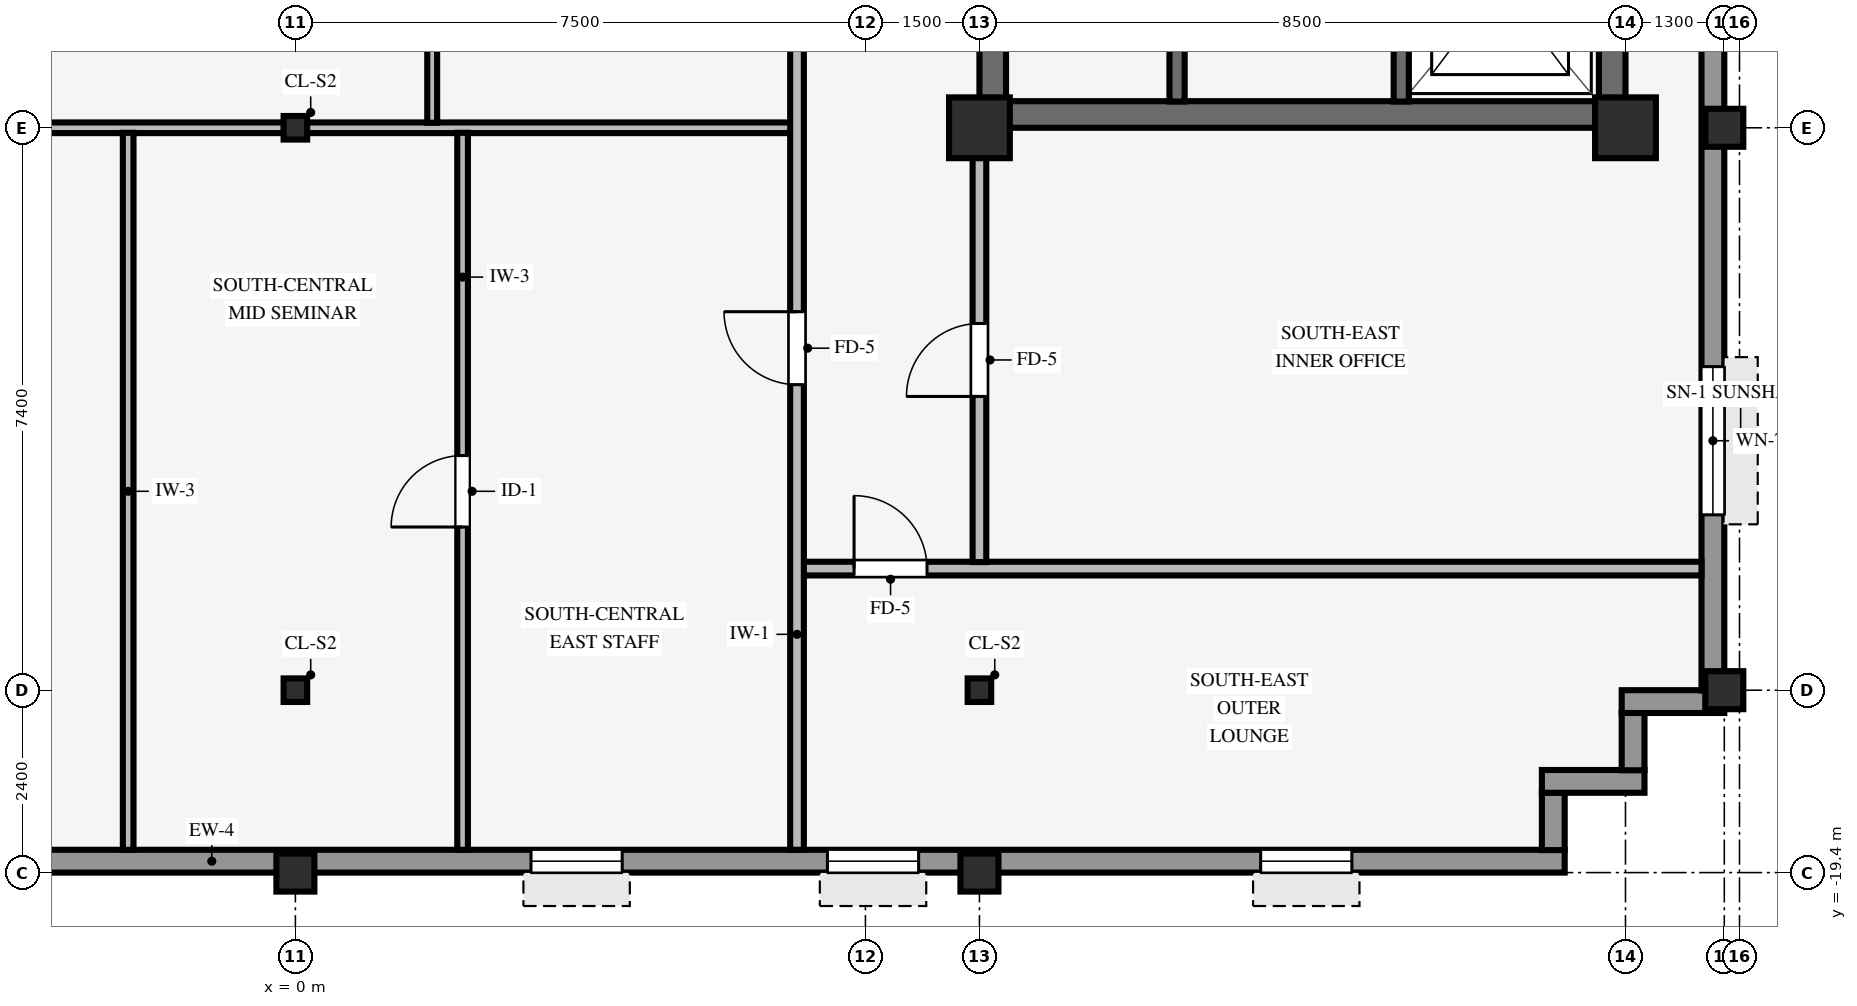
"""IFC4 building model, lengths in metres.
Left out: names, types, materials, properties, quantities, classifications, styles, units other than length and angle.
Written with IfcOpenShell. Run it as: python <this file> out.ifc"""

import sys

from ifc_helpers import new_model, si_unit, direction, frame, frame_2d, origin, origin_2d, place, context, subcontext, project, spatial, rectangle, hollow_rectangle, i_section, extrude, source, transform, mapped, element, fill, save


model = new_model("IFC4")
c1 = context("Model", 3, precision=1e-05, world=origin(), true_north=direction((0.0, 1.0)))
c2 = subcontext(c1, "Body", "Model", "MODEL_VIEW")
j1 = project(units=[si_unit("LENGTHUNIT", "METRE"), si_unit("PLANEANGLEUNIT", "RADIAN")], contexts=[c1])
p1 = place(None, origin())
s1 = spatial("IfcSite", under=j1, at=p1, CompositionType="ELEMENT")
p2 = place(p1, origin())
s2 = spatial("IfcBuilding", under=s1, at=p2, CompositionType="ELEMENT")
p3 = place(p2, frame((0.0, 0.0, 268.9)))
s3 = spatial("IfcBuildingStorey", under=s2, at=p3, CompositionType="ELEMENT", Elevation=268.9)
p4 = place(p3, frame((9.0, -9.425, 0.0), z_axis=(0.0, 0.0, 1.0), x_axis=(1.0, 0.0, 0.0)))
e1 = element("IfcWall", 1, at=p4, inside=s3, PredefinedType="SHEAR", context=c2, shape_type="SweptSolid", body=[
    extrude(rectangle(XDim=8.5, YDim=0.35, at=frame_2d((4.25, 0.0))), origin(), (0.0, 0.0, 1.0), 3.37),
])
p5 = place(p3, frame((9.175, -9.255, 0.0), z_axis=(0.0, 0.0, 1.0), x_axis=(0.0, 1.0, 0.0)))
e2 = element("IfcWall", 2, at=p5, inside=s3, PredefinedType="SHEAR", context=c2, shape_type="SweptSolid", body=[
    extrude(rectangle(XDim=18.51, YDim=0.35, at=frame_2d((9.255, 0.0))), origin(), (0.0, 0.0, 1.0), 3.37),
])
p6 = place(p5, frame((8.655, 0.0, 0.0)))
e3 = element("IfcOpeningElement", 3, at=p6, cuts=e2, PredefinedType="OPENING", context=c2, shape_type="SweptSolid", body=[
    extrude(rectangle(XDim=1.2, YDim=2.15, at=frame_2d((0.6, 1.075))), frame((0.0, 0.185, 0.0), z_axis=(0.0, -1.0, 0.0), x_axis=(1.0, 0.0, 0.0)), (0.0, 0.0, 1.0), 0.37),
])
p7 = place(p3, frame((17.325, -9.255, 0.0), z_axis=(0.0, 0.0, 1.0), x_axis=(0.0, 1.0, 0.0)))
e4 = element("IfcWall", 4, at=p7, inside=s3, PredefinedType="SHEAR", context=c2, shape_type="SweptSolid", body=[
    extrude(rectangle(XDim=18.51, YDim=0.35, at=frame_2d((9.255, 0.0))), origin(), (0.0, 0.0, 1.0), 3.37),
])
for number, where, z_axis, x_axis in (
    (5, (9.0, -9.6, 0.0), (0.0, 0.0, 1.0), (1.0, 0.0, 0.0)),
    (6, (17.5, -9.6, 0.0), (0.0, 0.0, 1.0), (1.0, 0.0, 0.0)),
):
    element("IfcColumn", number, at=place(p3, frame(where, z_axis=z_axis, x_axis=x_axis)), inside=s3, PredefinedType="COLUMN", context=c2, shape_type="SweptSolid", body=[
        extrude(rectangle(XDim=0.8, YDim=0.8, at=origin_2d()), origin(), (0.0, 0.0, 1.0), 3.37),
    ])
for number, where, z_axis, x_axis in (
    (7, (18.8, -17.0, 0.0), (0.0, 0.0, 1.0), (1.0, 0.0, 0.0)),
    (8, (18.8, -9.6, 0.0), (0.0, 0.0, 1.0), (1.0, 0.0, 0.0)),
    (9, (0.0, -19.4, 0.0), (0.0, 0.0, 1.0), (1.0, 0.0, 0.0)),
    (10, (9.0, -19.4, 0.0), (0.0, 0.0, 1.0), (1.0, 0.0, 0.0)),
):
    element("IfcColumn", number, at=place(p3, frame(where, z_axis=z_axis, x_axis=x_axis)), inside=s3, PredefinedType="COLUMN", context=c2, shape_type="SweptSolid", body=[
        extrude(hollow_rectangle(XDim=0.5, YDim=0.5, WallThickness=0.032, InnerFilletRadius=0.032, OuterFilletRadius=0.064, at=origin_2d()), origin(), (0.0, 0.0, 1.0), 3.37),
    ])
for number, where, z_axis, x_axis in (
    (11, (0.0, -17.0, 0.0), (0.0, 0.0, 1.0), (1.0, 0.0, 0.0)),
    (12, (0.0, -9.6, 0.0), (0.0, 0.0, 1.0), (1.0, 0.0, 0.0)),
    (13, (9.0, -17.0, 0.0), (0.0, 0.0, 1.0), (1.0, 0.0, 0.0)),
):
    element("IfcColumn", number, at=place(p3, frame(where, z_axis=z_axis, x_axis=x_axis)), inside=s3, PredefinedType="COLUMN", context=c2, shape_type="SweptSolid", body=[
        extrude(i_section(OverallWidth=0.31, OverallDepth=0.31, WebThickness=0.015, FlangeThickness=0.015, FilletRadius=0.015, at=origin_2d()), origin(), (0.0, 0.0, 1.0), 3.37),
    ])
p8 = place(p3, frame((-18.9, -19.25, 0.0), z_axis=(0.0, 0.0, 1.0), x_axis=(1.0, 0.0, 0.0)))
e14 = element("IfcWall", 14, at=p8, inside=s3, PredefinedType="STANDARD", context=c2, shape_type="SweptSolid", body=[
    extrude(rectangle(XDim=35.6, YDim=0.3, at=frame_2d((17.8, 0.0))), origin(), (0.0, 0.0, 1.0), 2.705),
])
p9 = place(p8, frame((1.9, 0.0, 0.8)))
e15 = element("IfcOpeningElement", 15, at=p9, cuts=e14, PredefinedType="OPENING", context=c2, shape_type="SweptSolid", body=[
    extrude(rectangle(XDim=1.2, YDim=1.48, at=frame_2d((0.6, 0.74))), frame((0.0, 0.16, 0.0), z_axis=(0.0, -1.0, 0.0), x_axis=(1.0, 0.0, 0.0)), (0.0, 0.0, 1.0), 0.32),
])
p10 = place(p8, frame((7.6, 0.0, 0.8)))
e16 = element("IfcOpeningElement", 16, at=p10, cuts=e14, PredefinedType="OPENING", context=c2, shape_type="SweptSolid", body=[
    extrude(rectangle(XDim=1.2, YDim=1.48, at=frame_2d((0.6, 0.74))), frame((0.0, 0.16, 0.0), z_axis=(0.0, -1.0, 0.0), x_axis=(1.0, 0.0, 0.0)), (0.0, 0.0, 1.0), 0.32),
])
p11 = place(p8, frame((12.85, 0.0, 0.8)))
e17 = element("IfcOpeningElement", 17, at=p11, cuts=e14, PredefinedType="OPENING", context=c2, shape_type="SweptSolid", body=[
    extrude(rectangle(XDim=1.2, YDim=1.48, at=frame_2d((0.6, 0.74))), frame((0.0, 0.16, 0.0), z_axis=(0.0, -1.0, 0.0), x_axis=(1.0, 0.0, 0.0)), (0.0, 0.0, 1.0), 0.32),
])
p12 = place(p8, frame((22.0, 0.0, 0.8)))
e18 = element("IfcOpeningElement", 18, at=p12, cuts=e14, PredefinedType="OPENING", context=c2, shape_type="SweptSolid", body=[
    extrude(rectangle(XDim=1.2, YDim=1.48, at=frame_2d((0.6, 0.74))), frame((0.0, 0.16, 0.0), z_axis=(0.0, -1.0, 0.0), x_axis=(1.0, 0.0, 0.0)), (0.0, 0.0, 1.0), 0.32),
])
p13 = place(p8, frame((25.9, 0.0, 0.8)))
e19 = element("IfcOpeningElement", 19, at=p13, cuts=e14, PredefinedType="OPENING", context=c2, shape_type="SweptSolid", body=[
    extrude(rectangle(XDim=1.2, YDim=1.48, at=frame_2d((0.6, 0.74))), frame((0.0, 0.16, 0.0), z_axis=(0.0, -1.0, 0.0), x_axis=(1.0, 0.0, 0.0)), (0.0, 0.0, 1.0), 0.32),
])
p14 = place(p8, frame((31.6, 0.0, 0.8)))
e20 = element("IfcOpeningElement", 20, at=p14, cuts=e14, PredefinedType="OPENING", context=c2, shape_type="SweptSolid", body=[
    extrude(rectangle(XDim=1.2, YDim=1.48, at=frame_2d((0.6, 0.74))), frame((0.0, 0.16, 0.0), z_axis=(0.0, -1.0, 0.0), x_axis=(1.0, 0.0, 0.0)), (0.0, 0.0, 1.0), 0.32),
])
p15 = place(p3, frame((16.55, -19.104, 0.0), z_axis=(0.0, 0.0, 1.0), x_axis=(0.0, 1.0, 0.0)))
e21 = element("IfcWall", 21, at=p15, inside=s3, PredefinedType="STANDARD", context=c2, shape_type="SweptSolid", body=[
    extrude(rectangle(XDim=0.758, YDim=0.3, at=frame_2d((0.379, 0.0))), origin(), (0.0, 0.0, 1.0), 2.892),
])
p16 = place(p3, frame((16.4, -18.2, 0.0), z_axis=(0.0, 0.0, 1.0), x_axis=(1.0, 0.0, 0.0)))
e22 = element("IfcWall", 22, at=p16, inside=s3, PredefinedType="STANDARD", context=c2, shape_type="SweptSolid", body=[
    extrude(rectangle(XDim=1.35, YDim=0.3, at=frame_2d((0.675, 0.0))), origin(), (0.0, 0.0, 1.0), 2.892),
])
p17 = place(p3, frame((17.6, -18.054, 0.0), z_axis=(0.0, 0.0, 1.0), x_axis=(0.0, 1.0, 0.0)))
e23 = element("IfcWall", 23, at=p17, inside=s3, PredefinedType="STANDARD", context=c2, shape_type="SweptSolid", body=[
    extrude(rectangle(XDim=0.758, YDim=0.3, at=frame_2d((0.379, 0.0))), origin(), (0.0, 0.0, 1.0), 2.892),
])
p18 = place(p3, frame((17.45, -17.15, 0.0), z_axis=(0.0, 0.0, 1.0), x_axis=(1.0, 0.0, 0.0)))
e24 = element("IfcWall", 24, at=p18, inside=s3, PredefinedType="STANDARD", context=c2, shape_type="SweptSolid", body=[
    extrude(rectangle(XDim=1.35, YDim=0.3, at=frame_2d((0.675, 0.0))), origin(), (0.0, 0.0, 1.0), 2.892),
])
p19 = place(p3, frame((18.65, -17.004, 0.0), z_axis=(0.0, 0.0, 1.0), x_axis=(0.0, 1.0, 0.0)))
e25 = element("IfcWall", 25, at=p19, inside=s3, PredefinedType="STANDARD", context=c2, shape_type="SweptSolid", body=[
    extrude(rectangle(XDim=34.008, YDim=0.3, at=frame_2d((17.004, 0.0))), origin(), (0.0, 0.0, 1.0), 2.705),
])
p20 = place(p19, frame((2.311, 0.0, 0.8)))
e26 = element("IfcOpeningElement", 26, at=p20, cuts=e25, PredefinedType="OPENING", context=c2, shape_type="SweptSolid", body=[
    extrude(rectangle(XDim=1.95, YDim=1.48, at=frame_2d((0.975, 0.74))), frame((0.0, 0.16, 0.0), z_axis=(0.0, -1.0, 0.0), x_axis=(1.0, 0.0, 0.0)), (0.0, 0.0, 1.0), 0.32),
])
p21 = place(p19, frame((29.747, 0.0, 0.8)))
e27 = element("IfcOpeningElement", 27, at=p21, cuts=e25, PredefinedType="OPENING", context=c2, shape_type="SweptSolid", body=[
    extrude(rectangle(XDim=1.95, YDim=1.48, at=frame_2d((0.975, 0.74))), frame((0.0, 0.16, 0.0), z_axis=(0.0, -1.0, 0.0), x_axis=(1.0, 0.0, 0.0)), (0.0, 0.0, 1.0), 0.32),
])
p22 = place(p3, frame((14.55, -9.255, 0.0), z_axis=(0.0, 0.0, 1.0), x_axis=(0.0, 1.0, 0.0)))
e28 = element("IfcWall", 28, at=p22, inside=s3, PredefinedType="SHEAR", context=c2, shape_type="SweptSolid", body=[
    extrude(rectangle(XDim=10.16, YDim=0.2, at=frame_2d((5.08, 0.0))), origin(), (0.0, 0.0, 1.0), 3.37),
])
p23 = place(p22, frame((6.615, 0.0, 0.0)))
e29 = element("IfcOpeningElement", 29, at=p23, cuts=e28, PredefinedType="OPENING", context=c2, shape_type="SweptSolid", body=[
    extrude(rectangle(XDim=0.88, YDim=2.1, at=frame_2d((0.44, 1.05))), frame((0.0, 0.11, 0.0), z_axis=(0.0, -1.0, 0.0), x_axis=(1.0, 0.0, 0.0)), (0.0, 0.0, 1.0), 0.22),
])
p24 = place(p22, frame((0.98, 0.0, 0.0)))
e30 = element("IfcOpeningElement", 30, at=p24, cuts=e28, PredefinedType="OPENING", context=c2, shape_type="SweptSolid", body=[
    extrude(rectangle(XDim=1.15, YDim=2.15, at=frame_2d((0.575, 1.075))), frame((0.0, 0.11, 0.0), z_axis=(0.0, -1.0, 0.0), x_axis=(1.0, 0.0, 0.0)), (0.0, 0.0, 1.0), 0.22),
])
p25 = place(p3, frame((11.6, -9.255, 0.0), z_axis=(0.0, 0.0, 1.0), x_axis=(0.0, 1.0, 0.0)))
e31 = element("IfcWall", 31, at=p25, inside=s3, PredefinedType="SHEAR", context=c2, shape_type="SweptSolid", body=[
    extrude(rectangle(XDim=8.025, YDim=0.2, at=frame_2d((4.012, 0.0))), origin(), (0.0, 0.0, 1.0), 3.37),
])
p26 = place(p25, frame((5.615, 0.0, 0.0)))
e32 = element("IfcOpeningElement", 32, at=p26, cuts=e31, PredefinedType="OPENING", context=c2, shape_type="SweptSolid", body=[
    extrude(rectangle(XDim=0.88, YDim=2.1, at=frame_2d((0.44, 1.05))), frame((0.0, 0.11, 0.0), z_axis=(0.0, -1.0, 0.0), x_axis=(1.0, 0.0, 0.0)), (0.0, 0.0, 1.0), 0.22),
])
p27 = place(p3, frame((6.661, -15.4, 0.0), z_axis=(0.0, 0.0, 1.0), x_axis=(1.0, 0.0, 0.0)))
e33 = element("IfcWall", 33, at=p27, inside=s3, PredefinedType="PARTITIONING", context=c2, shape_type="SweptSolid", body=[
    extrude(rectangle(XDim=11.839, YDim=0.18, at=frame_2d((5.919, 0.0))), origin(), (0.0, 0.0, 1.0), 3.36),
])
p28 = place(p27, frame((0.689, 0.0, 0.0)))
e34 = element("IfcOpeningElement", 34, at=p28, cuts=e33, PredefinedType="OPENING", context=c2, shape_type="SweptSolid", body=[
    extrude(rectangle(XDim=0.96, YDim=2.1, at=frame_2d((0.48, 1.05))), frame((0.0, 0.1, 0.0), z_axis=(0.0, -1.0, 0.0), x_axis=(1.0, 0.0, 0.0)), (0.0, 0.0, 1.0), 0.2),
])
p29 = place(p3, frame((-6.534, -9.6, 0.0), z_axis=(0.0, 0.0, 1.0), x_axis=(1.0, 0.0, 0.0)))
e35 = element("IfcWall", 35, at=p29, inside=s3, PredefinedType="PARTITIONING", context=c2, shape_type="SweptSolid", body=[
    extrude(rectangle(XDim=6.383, YDim=0.14, at=frame_2d((3.191, 0.0))), origin(), (0.0, 0.0, 1.0), 2.405),
])
p30 = place(p3, frame((0.151, -9.6, 0.0), z_axis=(0.0, 0.0, 1.0), x_axis=(1.0, 0.0, 0.0)))
e36 = element("IfcWall", 36, at=p30, inside=s3, PredefinedType="PARTITIONING", context=c2, shape_type="SweptSolid", body=[
    extrude(rectangle(XDim=6.388, YDim=0.14, at=frame_2d((3.194, 0.0))), origin(), (0.0, 0.0, 1.0), 2.405),
])
p31 = place(p3, frame((-2.2, -19.1, 0.0), z_axis=(0.0, 0.0, 1.0), x_axis=(0.0, 1.0, 0.0)))
e37 = element("IfcWall", 37, at=p31, inside=s3, PredefinedType="PARTITIONING", context=c2, shape_type="SweptSolid", body=[
    extrude(rectangle(XDim=9.434, YDim=0.14, at=frame_2d((4.717, 0.0))), origin(), (0.0, 0.0, 1.0), 3.36),
])
p32 = place(p3, frame((1.8, -9.534, 0.0), z_axis=(0.0, 0.0, 1.0), x_axis=(0.0, 1.0, 0.0)))
e38 = element("IfcWall", 38, at=p32, inside=s3, PredefinedType="PARTITIONING", context=c2, shape_type="SweptSolid", body=[
    extrude(rectangle(XDim=8.198, YDim=0.13, at=frame_2d((4.099, 0.0))), origin(), (0.0, 0.0, 1.0), 3.36),
])
p33 = place(p3, frame((2.2, -19.1, 0.0), z_axis=(0.0, 0.0, 1.0), x_axis=(0.0, 1.0, 0.0)))
e39 = element("IfcWall", 39, at=p33, inside=s3, PredefinedType="PARTITIONING", context=c2, shape_type="SweptSolid", body=[
    extrude(rectangle(XDim=9.434, YDim=0.14, at=frame_2d((4.717, 0.0))), origin(), (0.0, 0.0, 1.0), 3.36),
])
p34 = place(p33, frame((4.247, 0.0, 0.0)))
e40 = element("IfcOpeningElement", 40, at=p34, cuts=e39, PredefinedType="OPENING", context=c2, shape_type="SweptSolid", body=[
    extrude(rectangle(XDim=0.94, YDim=2.1, at=frame_2d((0.47, 1.05))), frame((0.0, 0.08, 0.0), z_axis=(0.0, -1.0, 0.0), x_axis=(1.0, 0.0, 0.0)), (0.0, 0.0, 1.0), 0.16),
])
p35 = place(p3, frame((6.6, -19.1, 0.0), z_axis=(0.0, 0.0, 1.0), x_axis=(0.0, 1.0, 0.0)))
e41 = element("IfcWall", 41, at=p35, inside=s3, PredefinedType="PARTITIONING", context=c2, shape_type="SweptSolid", body=[
    extrude(rectangle(XDim=17.764, YDim=0.18, at=frame_2d((8.882, 0.0))), origin(), (0.0, 0.0, 1.0), 3.36),
])
p36 = place(p35, frame((13.152, 0.0, 0.0)))
e42 = element("IfcOpeningElement", 42, at=p36, cuts=e41, PredefinedType="OPENING", context=c2, shape_type="SweptSolid", body=[
    extrude(rectangle(XDim=0.96, YDim=2.1, at=frame_2d((0.48, 1.05))), frame((0.0, 0.1, 0.0), z_axis=(0.0, -1.0, 0.0), x_axis=(1.0, 0.0, 0.0)), (0.0, 0.0, 1.0), 0.2),
])
p37 = place(p35, frame((6.12, 0.0, 0.0)))
e43 = element("IfcOpeningElement", 43, at=p37, cuts=e41, PredefinedType="OPENING", context=c2, shape_type="SweptSolid", body=[
    extrude(rectangle(XDim=0.96, YDim=2.1, at=frame_2d((0.48, 1.05))), frame((0.0, 0.1, 0.0), z_axis=(0.0, -1.0, 0.0), x_axis=(1.0, 0.0, 0.0)), (0.0, 0.0, 1.0), 0.2),
])
p38 = place(p3, frame((9.0, -15.314, 0.0), z_axis=(0.0, 0.0, 1.0), x_axis=(0.0, 1.0, 0.0)))
e44 = element("IfcWall", 44, at=p38, inside=s3, PredefinedType="PARTITIONING", context=c2, shape_type="SweptSolid", body=[
    extrude(rectangle(XDim=5.318, YDim=0.18, at=frame_2d((2.659, 0.0))), origin(), (0.0, 0.0, 1.0), 2.892),
])
p39 = place(p38, frame((2.179, 0.0, 0.0)))
e45 = element("IfcOpeningElement", 45, at=p39, cuts=e44, PredefinedType="OPENING", context=c2, shape_type="SweptSolid", body=[
    extrude(rectangle(XDim=0.96, YDim=2.1, at=frame_2d((0.48, 1.05))), frame((0.0, 0.1, 0.0), z_axis=(0.0, -1.0, 0.0), x_axis=(1.0, 0.0, 0.0)), (0.0, 0.0, 1.0), 0.2),
])
m1 = source(origin(), c2, "Body", "SweptSolid", [
    extrude(rectangle(XDim=1.2, YDim=1.48, at=frame_2d((0.6, 0.74))), frame((0.0, 0.03, 0.0), z_axis=(0.0, -1.0, 0.0), x_axis=(1.0, 0.0, 0.0)), (0.0, 0.0, 1.0), 0.06),
])
p40 = place(p12, origin())
e46 = element("IfcWindow", 46, at=p40, inside=s3, PartitioningType="SINGLE_PANEL", PredefinedType="WINDOW", context=c2, shape_type="MappedRepresentation", body=[
    mapped(m1, transform((0.0, 0.0, 0.0), scale=1.0)),
])
fill(e18, e46)
p41 = place(p13, origin())
e47 = element("IfcWindow", 47, at=p41, inside=s3, PartitioningType="SINGLE_PANEL", PredefinedType="WINDOW", context=c2, shape_type="MappedRepresentation", body=[
    mapped(m1, transform((0.0, 0.0, 0.0), scale=1.0)),
])
fill(e19, e47)
p42 = place(p14, origin())
e48 = element("IfcWindow", 48, at=p42, inside=s3, PartitioningType="SINGLE_PANEL", PredefinedType="WINDOW", context=c2, shape_type="MappedRepresentation", body=[
    mapped(m1, transform((0.0, 0.0, 0.0), scale=1.0)),
])
fill(e20, e48)
m2 = source(origin(), c2, "Body", "SweptSolid", [
    extrude(rectangle(XDim=1.95, YDim=1.48, at=frame_2d((0.975, 0.74))), frame((0.0, 0.03, 0.0), z_axis=(0.0, -1.0, 0.0), x_axis=(1.0, 0.0, 0.0)), (0.0, 0.0, 1.0), 0.06),
])
p43 = place(p20, origin())
e49 = element("IfcWindow", 49, at=p43, inside=s3, PartitioningType="SINGLE_PANEL", PredefinedType="WINDOW", context=c2, shape_type="MappedRepresentation", body=[
    mapped(m2, transform((0.0, 0.0, 0.0), scale=1.0)),
])
fill(e26, e49)
m3 = source(origin(), c2, "Body", "SweptSolid", [
    extrude(rectangle(XDim=0.96, YDim=2.1, at=frame_2d((0.48, 1.05))), frame((0.0, 0.025, 0.0), z_axis=(0.0, -1.0, 0.0), x_axis=(1.0, 0.0, 0.0)), (0.0, 0.0, 1.0), 0.05),
])
p44 = place(p37, origin())
e50 = element("IfcDoor", 50, at=p44, inside=s3, OperationType="SINGLE_SWING_RIGHT", PredefinedType="DOOR", context=c2, shape_type="MappedRepresentation", body=[
    mapped(m3, transform((0.0, 0.0, 0.0), scale=1.0)),
])
fill(e43, e50)
p45 = place(p39, origin())
e51 = element("IfcDoor", 51, at=p45, inside=s3, OperationType="SINGLE_SWING_LEFT", PredefinedType="DOOR", context=c2, shape_type="MappedRepresentation", body=[
    mapped(m3, transform((0.0, 0.0, 0.0), scale=1.0)),
])
fill(e45, e51)
p46 = place(p28, origin())
e52 = element("IfcDoor", 52, at=p46, inside=s3, OperationType="SINGLE_SWING_LEFT", PredefinedType="DOOR", context=c2, shape_type="MappedRepresentation", body=[
    mapped(m3, transform((0.0, 0.0, 0.0), scale=1.0)),
])
fill(e34, e52)
m4 = source(origin(), c2, "Body", "SweptSolid", [
    extrude(rectangle(XDim=0.94, YDim=2.1, at=frame_2d((0.47, 1.05))), frame((0.0, 0.025, 0.0), z_axis=(0.0, -1.0, 0.0), x_axis=(1.0, 0.0, 0.0)), (0.0, 0.0, 1.0), 0.05),
])
p47 = place(p34, origin())
e53 = element("IfcDoor", 53, at=p47, inside=s3, OperationType="SINGLE_SWING_LEFT", PredefinedType="DOOR", context=c2, shape_type="MappedRepresentation", body=[
    mapped(m4, transform((0.0, 0.0, 0.0), scale=1.0)),
])
fill(e40, e53)
save(model, sys.argv[1])
